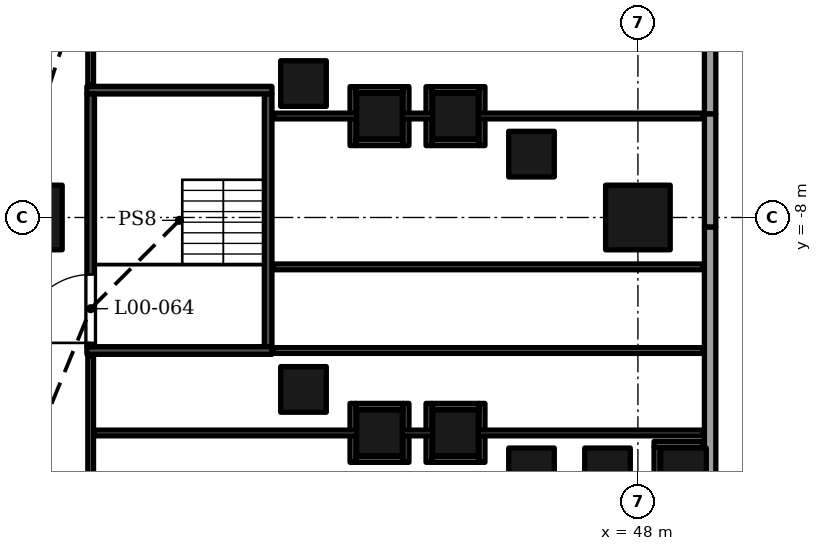
"""IFC4 building model, lengths in metres.
Left out: names, types, materials, properties, quantities, classifications, styles, units other than length and angle.
Written with IfcOpenShell. Run it as: python <this file> out.ifc"""

import sys

from ifc_helpers import new_model, si_unit, direction, frame, frame_2d, origin, origin_2d, place, context, subcontext, project, spatial, rectangle, extrude, element, fill, save


model = new_model("IFC4")
c1 = context("Model", 3, precision=1e-05, world=origin(), true_north=direction((0.0, 1.0)))
c2 = subcontext(c1, "Body", "Model", "MODEL_VIEW")
j1 = project(units=[si_unit("LENGTHUNIT", "METRE"), si_unit("PLANEANGLEUNIT", "RADIAN")], contexts=[c1])
p1 = place(None, origin())
s1 = spatial("IfcSite", under=j1, at=p1, CompositionType="ELEMENT")
p2 = place(p1, origin())
s2 = spatial("IfcBuilding", under=s1, at=p2, CompositionType="ELEMENT")
p3 = place(p2, origin())
s3 = spatial("IfcBuildingStorey", under=s2, at=p3, CompositionType="ELEMENT", Elevation=0.0)
for number, where, z_axis, x_axis in (
    (1, (32.0, -8.0, 0.0), (0.0, 0.0, 1.0), (1.0, 0.0, 0.0)),
    (2, (48.0, -8.0, 0.0), (0.0, 0.0, 1.0), (1.0, 0.0, 0.0)),
):
    element("IfcColumn", number, at=place(p3, frame(where, z_axis=z_axis, x_axis=x_axis)), inside=s3, PredefinedType="COLUMN", context=c2, shape_type="SweptSolid", body=[
        extrude(rectangle(XDim=1.7, YDim=1.7, at=origin_2d()), origin(), (0.0, 0.0, 1.0), 9.0),
    ])
for number, where, z_axis, x_axis in (
    (3, (39.2, -4.476, 0.0), (0.0, 0.0, 1.0), (1.0, 0.0, 0.0)),
    (4, (39.2, -12.524, 0.0), (0.0, 0.0, 1.0), (1.0, 0.0, 0.0)),
    (5, (41.2, -5.333, 0.0), (0.0, 0.0, 1.0), (1.0, 0.0, 0.0)),
    (6, (41.2, -13.667, 0.0), (0.0, 0.0, 1.0), (1.0, 0.0, 0.0)),
    (7, (43.2, -5.333, 0.0), (0.0, 0.0, 1.0), (1.0, 0.0, 0.0)),
    (8, (43.2, -13.667, 0.0), (0.0, 0.0, 1.0), (1.0, 0.0, 0.0)),
    (9, (45.2, -6.333, 0.0), (0.0, 0.0, 1.0), (1.0, 0.0, 0.0)),
    (10, (45.2, -14.667, 0.0), (0.0, 0.0, 1.0), (1.0, 0.0, 0.0)),
    (11, (47.2, -14.667, 0.0), (0.0, 0.0, 1.0), (1.0, 0.0, 0.0)),
    (12, (49.2, -14.667, 0.0), (0.0, 0.0, 1.0), (1.0, 0.0, 0.0)),
):
    element("IfcColumn", number, at=place(p3, frame(where, z_axis=z_axis, x_axis=x_axis)), inside=s3, PredefinedType="COLUMN", context=c2, shape_type="SweptSolid", body=[
        extrude(rectangle(XDim=1.2, YDim=1.2, at=origin_2d()), origin(), (0.0, 0.0, 1.0), 9.0),
    ])
p4 = place(p3, frame((49.9, -14.948, 0.0), z_axis=(0.0, 0.0, 1.0), x_axis=(0.0, 1.0, 0.0)))
e13 = element("IfcWall", 13, at=p4, inside=s3, PredefinedType="ELEMENTEDWALL", context=c2, shape_type="SweptSolid", body=[
    extrude(rectangle(XDim=6.7, YDim=0.3, at=frame_2d((3.35, 0.0))), origin(), (0.0, 0.0, 1.0), 7.6),
])
p5 = place(p4, frame((3.548, 0.0, 0.0)))
e14 = element("IfcOpeningElement", 14, at=p5, cuts=e13, PredefinedType="OPENING", context=c2, shape_type="SweptSolid", body=[
    extrude(rectangle(XDim=2.0, YDim=2.4, at=frame_2d((1.0, 1.2))), frame((0.0, 0.16, 0.0), z_axis=(0.0, -1.0, 0.0), x_axis=(1.0, 0.0, 0.0)), (0.0, 0.0, 1.0), 0.32),
])
p6 = place(p3, frame((49.9, -8.248, 0.0), z_axis=(0.0, 0.0, 1.0), x_axis=(0.0, 1.0, 0.0)))
e15 = element("IfcWall", 15, at=p6, inside=s3, PredefinedType="ELEMENTEDWALL", context=c2, shape_type="SweptSolid", body=[
    extrude(rectangle(XDim=2.977, YDim=0.3, at=frame_2d((1.489, 0.0))), origin(), (0.0, 0.0, 1.0), 7.6),
])
p7 = place(p6, frame((1.152, 0.0, 0.0)))
e16 = element("IfcOpeningElement", 16, at=p7, cuts=e15, PredefinedType="OPENING", context=c2, shape_type="SweptSolid", body=[
    extrude(rectangle(XDim=1.2, YDim=2.7, at=frame_2d((0.6, 1.35))), frame((0.0, 0.16, 0.0), z_axis=(0.0, -1.0, 0.0), x_axis=(1.0, 0.0, 0.0)), (0.0, 0.0, 1.0), 0.32),
])
p8 = place(p3, frame((49.9, -5.271, 0.0), z_axis=(0.0, 0.0, 1.0), x_axis=(0.0, 1.0, 0.0)))
e17 = element("IfcWall", 17, at=p8, inside=s3, PredefinedType="ELEMENTEDWALL", context=c2, shape_type="SweptSolid", body=[
    extrude(rectangle(XDim=2.748, YDim=0.3, at=frame_2d((1.374, 0.0))), origin(), (0.0, 0.0, 1.0), 7.6),
])
p9 = place(p8, frame((0.625, 0.0, 0.0)))
e18 = element("IfcOpeningElement", 18, at=p9, cuts=e17, PredefinedType="OPENING", context=c2, shape_type="SweptSolid", body=[
    extrude(rectangle(XDim=1.8, YDim=2.7, at=frame_2d((0.9, 1.35))), frame((0.0, 0.16, 0.0), z_axis=(0.0, -1.0, 0.0), x_axis=(1.0, 0.0, 0.0)), (0.0, 0.0, 1.0), 0.32),
])
for number, where, z_axis, x_axis in (
    (19, (49.85, -25.093, 9.0), (0.0, 0.0, 1.0), (0.0, 1.0, 0.0)),
    (20, (49.85, -10.395, 9.0), (0.0, 0.0, 1.0), (0.0, 1.0, 0.0)),
):
    element("IfcWall", number, at=place(p3, frame(where, z_axis=z_axis, x_axis=x_axis)), inside=s3, PredefinedType="PARAPET", context=c2, shape_type="SweptSolid", body=[
        extrude(rectangle(XDim=14.698, YDim=0.3, at=frame_2d((7.349, 0.0))), origin(), (0.0, 0.0, 1.0), 1.1),
    ])
for number, where, z_axis, x_axis in (
    (21, (33.5, -11.5, 0.0), (0.0, 0.0, 1.0), (1.0, 0.0, 0.0)),
    (22, (33.5, -4.65, 0.0), (0.0, 0.0, 1.0), (1.0, 0.0, 0.0)),
):
    element("IfcWall", number, at=place(p3, frame(where, z_axis=z_axis, x_axis=x_axis)), inside=s3, PredefinedType="SOLIDWALL", context=c2, shape_type="SweptSolid", body=[
        extrude(rectangle(XDim=4.87, YDim=0.2, at=frame_2d((2.435, 0.0))), origin(), (0.0, 0.0, 1.0), 8.5),
    ])
p10 = place(p3, frame((33.6, -11.4, 0.0), z_axis=(0.0, 0.0, 1.0), x_axis=(0.0, 1.0, 0.0)))
e23 = element("IfcWall", 23, at=p10, inside=s3, PredefinedType="SOLIDWALL", context=c2, shape_type="SweptSolid", body=[
    extrude(rectangle(XDim=6.65, YDim=0.2, at=frame_2d((3.325, 0.0))), origin(), (0.0, 0.0, 1.0), 8.5),
])
p11 = place(p10, frame((0.1, 0.0, 0.0)))
e24 = element("IfcOpeningElement", 24, at=p11, cuts=e23, PredefinedType="OPENING", context=c2, shape_type="SweptSolid", body=[
    extrude(rectangle(XDim=1.8, YDim=2.4, at=frame_2d((0.9, 1.2))), frame((0.0, 0.11, 0.0), z_axis=(0.0, -1.0, 0.0), x_axis=(1.0, 0.0, 0.0)), (0.0, 0.0, 1.0), 0.22),
])
p12 = place(p3, frame((38.27, -11.4, 0.0), z_axis=(0.0, 0.0, 1.0), x_axis=(0.0, 1.0, 0.0)))
e25 = element("IfcWall", 25, at=p12, inside=s3, PredefinedType="SOLIDWALL", context=c2, shape_type="SweptSolid", body=[
    extrude(rectangle(XDim=6.65, YDim=0.2, at=frame_2d((3.325, 0.0))), origin(), (0.0, 0.0, 1.0), 8.5),
])
p13 = place(p12, frame((0.1, 0.0, 0.0)))
e26 = element("IfcOpeningElement", 26, at=p13, cuts=e25, PredefinedType="OPENING", context=c2, shape_type="SweptSolid", body=[
    extrude(rectangle(XDim=1.8, YDim=2.4, at=frame_2d((0.9, 1.2))), frame((0.0, 0.11, 0.0), z_axis=(0.0, -1.0, 0.0), x_axis=(1.0, 0.0, 0.0)), (0.0, 0.0, 1.0), 0.22),
])
p14 = place(p3, frame((33.6, -20.61, 0.0), z_axis=(0.0, 0.0, 1.0), x_axis=(0.0, 1.0, 0.0)))
e27 = element("IfcWall", 27, at=p14, inside=s3, PredefinedType="PARTITIONING", context=c2, shape_type="SweptSolid", body=[
    extrude(rectangle(XDim=8.97, YDim=0.15, at=frame_2d((4.485, 0.0))), origin(), (0.0, 0.0, 1.0), 8.5),
])
p15 = place(p14, frame((2.89, 0.0, 0.0)))
e28 = element("IfcOpeningElement", 28, at=p15, cuts=e27, PredefinedType="OPENING", context=c2, shape_type="SweptSolid", body=[
    extrude(rectangle(XDim=1.2, YDim=2.1, at=frame_2d((0.6, 1.05))), frame((0.0, 0.085, 0.0), z_axis=(0.0, -1.0, 0.0), x_axis=(1.0, 0.0, 0.0)), (0.0, 0.0, 1.0), 0.17),
])
p16 = place(p3, frame((48.5, -15.292, 0.0), z_axis=(0.0, 0.0, 1.0), x_axis=(0.0, 1.0, 0.0)))
e29 = element("IfcWall", 29, at=p16, inside=s3, PredefinedType="PARTITIONING", context=c2, shape_type="SweptSolid", body=[
    extrude(rectangle(XDim=1.25, YDim=0.15, at=frame_2d((0.625, 0.0))), origin(), (0.0, 0.0, 1.0), 8.5),
])
p17 = place(p3, frame((40.5, -14.442, 0.0), z_axis=(0.0, 0.0, 1.0), x_axis=(0.0, 1.0, 0.0)))
e30 = element("IfcWall", 30, at=p17, inside=s3, PredefinedType="PARTITIONING", context=c2, shape_type="SweptSolid", body=[
    extrude(rectangle(XDim=1.55, YDim=0.15, at=frame_2d((0.775, 0.0))), origin(), (0.0, 0.0, 1.0), 8.5),
])
p18 = place(p3, frame((40.575, -14.367, 0.0), z_axis=(0.0, 0.0, 1.0), x_axis=(1.0, 0.0, 0.0)))
e31 = element("IfcWall", 31, at=p18, inside=s3, PredefinedType="PARTITIONING", context=c2, shape_type="SweptSolid", body=[
    extrude(rectangle(XDim=1.25, YDim=0.15, at=frame_2d((0.625, 0.0))), origin(), (0.0, 0.0, 1.0), 8.5),
])
for number, where, z_axis, x_axis in (
    (32, (41.9, -14.442, 0.0), (0.0, 0.0, 1.0), (0.0, 1.0, 0.0)),
    (33, (42.5, -14.442, 0.0), (0.0, 0.0, 1.0), (0.0, 1.0, 0.0)),
):
    element("IfcWall", number, at=place(p3, frame(where, z_axis=z_axis, x_axis=x_axis)), inside=s3, PredefinedType="PARTITIONING", context=c2, shape_type="SweptSolid", body=[
        extrude(rectangle(XDim=1.55, YDim=0.15, at=frame_2d((0.775, 0.0))), origin(), (0.0, 0.0, 1.0), 8.5),
    ])
p19 = place(p3, frame((42.575, -14.367, 0.0), z_axis=(0.0, 0.0, 1.0), x_axis=(1.0, 0.0, 0.0)))
e34 = element("IfcWall", 34, at=p19, inside=s3, PredefinedType="PARTITIONING", context=c2, shape_type="SweptSolid", body=[
    extrude(rectangle(XDim=1.25, YDim=0.15, at=frame_2d((0.625, 0.0))), origin(), (0.0, 0.0, 1.0), 8.5),
])
p20 = place(p3, frame((43.9, -14.442, 0.0), z_axis=(0.0, 0.0, 1.0), x_axis=(0.0, 1.0, 0.0)))
e35 = element("IfcWall", 35, at=p20, inside=s3, PredefinedType="PARTITIONING", context=c2, shape_type="SweptSolid", body=[
    extrude(rectangle(XDim=1.55, YDim=0.15, at=frame_2d((0.775, 0.0))), origin(), (0.0, 0.0, 1.0), 8.5),
])
p21 = place(p3, frame((48.425, -13.967, 0.0), z_axis=(0.0, 0.0, 1.0), x_axis=(1.0, 0.0, 0.0)))
e36 = element("IfcWall", 36, at=p21, inside=s3, PredefinedType="PARTITIONING", context=c2, shape_type="SweptSolid", body=[
    extrude(rectangle(XDim=1.295, YDim=0.15, at=frame_2d((0.647, 0.0))), origin(), (0.0, 0.0, 1.0), 8.5),
])
p22 = place(p3, frame((33.675, -13.67, 0.0), z_axis=(0.0, 0.0, 1.0), x_axis=(1.0, 0.0, 0.0)))
e37 = element("IfcWall", 37, at=p22, inside=s3, PredefinedType="PARTITIONING", context=c2, shape_type="SweptSolid", body=[
    extrude(rectangle(XDim=6.925, YDim=0.15, at=frame_2d((3.462, 0.0))), origin(), (0.0, 0.0, 1.0), 8.5),
])
p23 = place(p3, frame((41.8, -13.67, 0.0), z_axis=(0.0, 0.0, 1.0), x_axis=(1.0, 0.0, 0.0)))
e38 = element("IfcWall", 38, at=p23, inside=s3, PredefinedType="PARTITIONING", context=c2, shape_type="SweptSolid", body=[
    extrude(rectangle(XDim=0.8, YDim=0.15, at=frame_2d((0.4, 0.0))), origin(), (0.0, 0.0, 1.0), 8.5),
])
p24 = place(p3, frame((43.8, -13.67, 0.0), z_axis=(0.0, 0.0, 1.0), x_axis=(1.0, 0.0, 0.0)))
e39 = element("IfcWall", 39, at=p24, inside=s3, PredefinedType="PARTITIONING", context=c2, shape_type="SweptSolid", body=[
    extrude(rectangle(XDim=5.92, YDim=0.15, at=frame_2d((2.96, 0.0))), origin(), (0.0, 0.0, 1.0), 7.6),
])
for number, where, z_axis, x_axis in (
    (40, (40.575, -12.967, 0.0), (0.0, 0.0, 1.0), (1.0, 0.0, 0.0)),
    (41, (42.575, -12.967, 0.0), (0.0, 0.0, 1.0), (1.0, 0.0, 0.0)),
):
    element("IfcWall", number, at=place(p3, frame(where, z_axis=z_axis, x_axis=x_axis)), inside=s3, PredefinedType="PARTITIONING", context=c2, shape_type="SweptSolid", body=[
        extrude(rectangle(XDim=1.25, YDim=0.15, at=frame_2d((0.625, 0.0))), origin(), (0.0, 0.0, 1.0), 8.5),
    ])
p25 = place(p3, frame((38.41, -11.5, 0.0), z_axis=(0.0, 0.0, 1.0), x_axis=(1.0, 0.0, 0.0)))
e42 = element("IfcWall", 42, at=p25, inside=s3, PredefinedType="PARTITIONING", context=c2, shape_type="SweptSolid", body=[
    extrude(rectangle(XDim=11.31, YDim=0.151, at=frame_2d((5.655, 0.0))), origin(), (0.0, 0.0, 1.0), 7.6),
])
p26 = place(p25, frame((5.04, 0.0, 0.0)))
e43 = element("IfcOpeningElement", 43, at=p26, cuts=e42, PredefinedType="OPENING", context=c2, shape_type="SweptSolid", body=[
    extrude(rectangle(XDim=1.2, YDim=2.1, at=frame_2d((0.6, 1.05))), frame((0.0, 0.085, 0.0), z_axis=(0.0, -1.0, 0.0), x_axis=(1.0, 0.0, 0.0)), (0.0, 0.0, 1.0), 0.171),
])
p27 = place(p3, frame((38.41, -9.3, 0.0), z_axis=(0.0, 0.0, 1.0), x_axis=(1.0, 0.0, 0.0)))
e44 = element("IfcWall", 44, at=p27, inside=s3, PredefinedType="PARTITIONING", context=c2, shape_type="SweptSolid", body=[
    extrude(rectangle(XDim=11.31, YDim=0.151, at=frame_2d((5.655, 0.0))), origin(), (0.0, 0.0, 1.0), 7.6),
])
p28 = place(p27, frame((4.961, 0.0, 0.0)))
e45 = element("IfcOpeningElement", 45, at=p28, cuts=e44, PredefinedType="OPENING", context=c2, shape_type="SweptSolid", body=[
    extrude(rectangle(XDim=1.2, YDim=2.1, at=frame_2d((0.6, 1.05))), frame((0.0, 0.085, 0.0), z_axis=(0.0, -1.0, 0.0), x_axis=(1.0, 0.0, 0.0)), (0.0, 0.0, 1.0), 0.171),
])
p29 = place(p3, frame((40.5, -6.108, 0.0), z_axis=(0.0, 0.0, 1.0), x_axis=(0.0, 1.0, 0.0)))
e46 = element("IfcWall", 46, at=p29, inside=s3, PredefinedType="PARTITIONING", context=c2, shape_type="SweptSolid", body=[
    extrude(rectangle(XDim=1.55, YDim=0.15, at=frame_2d((0.775, 0.0))), origin(), (0.0, 0.0, 1.0), 8.5),
])
p30 = place(p3, frame((40.575, -6.033, 0.0), z_axis=(0.0, 0.0, 1.0), x_axis=(1.0, 0.0, 0.0)))
e47 = element("IfcWall", 47, at=p30, inside=s3, PredefinedType="PARTITIONING", context=c2, shape_type="SweptSolid", body=[
    extrude(rectangle(XDim=1.25, YDim=0.15, at=frame_2d((0.625, 0.0))), origin(), (0.0, 0.0, 1.0), 8.5),
])
for number, where, z_axis, x_axis in (
    (48, (41.9, -6.108, 0.0), (0.0, 0.0, 1.0), (0.0, 1.0, 0.0)),
    (49, (42.5, -6.108, 0.0), (0.0, 0.0, 1.0), (0.0, 1.0, 0.0)),
):
    element("IfcWall", number, at=place(p3, frame(where, z_axis=z_axis, x_axis=x_axis)), inside=s3, PredefinedType="PARTITIONING", context=c2, shape_type="SweptSolid", body=[
        extrude(rectangle(XDim=1.55, YDim=0.15, at=frame_2d((0.775, 0.0))), origin(), (0.0, 0.0, 1.0), 8.5),
    ])
p31 = place(p3, frame((42.575, -6.033, 0.0), z_axis=(0.0, 0.0, 1.0), x_axis=(1.0, 0.0, 0.0)))
e50 = element("IfcWall", 50, at=p31, inside=s3, PredefinedType="PARTITIONING", context=c2, shape_type="SweptSolid", body=[
    extrude(rectangle(XDim=1.25, YDim=0.15, at=frame_2d((0.625, 0.0))), origin(), (0.0, 0.0, 1.0), 8.5),
])
p32 = place(p3, frame((43.9, -6.108, 0.0), z_axis=(0.0, 0.0, 1.0), x_axis=(0.0, 1.0, 0.0)))
e51 = element("IfcWall", 51, at=p32, inside=s3, PredefinedType="PARTITIONING", context=c2, shape_type="SweptSolid", body=[
    extrude(rectangle(XDim=1.55, YDim=0.15, at=frame_2d((0.775, 0.0))), origin(), (0.0, 0.0, 1.0), 8.5),
])
p33 = place(p3, frame((38.41, -5.33, 0.0), z_axis=(0.0, 0.0, 1.0), x_axis=(1.0, 0.0, 0.0)))
e52 = element("IfcWall", 52, at=p33, inside=s3, PredefinedType="PARTITIONING", context=c2, shape_type="SweptSolid", body=[
    extrude(rectangle(XDim=2.19, YDim=0.15, at=frame_2d((1.095, 0.0))), origin(), (0.0, 0.0, 1.0), 8.5),
])
p34 = place(p3, frame((41.8, -5.33, 0.0), z_axis=(0.0, 0.0, 1.0), x_axis=(1.0, 0.0, 0.0)))
e53 = element("IfcWall", 53, at=p34, inside=s3, PredefinedType="PARTITIONING", context=c2, shape_type="SweptSolid", body=[
    extrude(rectangle(XDim=0.8, YDim=0.15, at=frame_2d((0.4, 0.0))), origin(), (0.0, 0.0, 1.0), 8.5),
])
p35 = place(p3, frame((43.8, -5.33, 0.0), z_axis=(0.0, 0.0, 1.0), x_axis=(1.0, 0.0, 0.0)))
e54 = element("IfcWall", 54, at=p35, inside=s3, PredefinedType="PARTITIONING", context=c2, shape_type="SweptSolid", body=[
    extrude(rectangle(XDim=5.92, YDim=0.15, at=frame_2d((2.96, 0.0))), origin(), (0.0, 0.0, 1.0), 7.6),
])
for number, where, z_axis, x_axis in (
    (55, (40.575, -4.633, 0.0), (0.0, 0.0, 1.0), (1.0, 0.0, 0.0)),
    (56, (42.575, -4.633, 0.0), (0.0, 0.0, 1.0), (1.0, 0.0, 0.0)),
):
    element("IfcWall", number, at=place(p3, frame(where, z_axis=z_axis, x_axis=x_axis)), inside=s3, PredefinedType="PARTITIONING", context=c2, shape_type="SweptSolid", body=[
        extrude(rectangle(XDim=1.25, YDim=0.15, at=frame_2d((0.625, 0.0))), origin(), (0.0, 0.0, 1.0), 8.5),
    ])
p36 = place(p3, frame((33.6, -4.51, 0.0), z_axis=(0.0, 0.0, 1.0), x_axis=(0.0, 1.0, 0.0)))
e57 = element("IfcWall", 57, at=p36, inside=s3, PredefinedType="PARTITIONING", context=c2, shape_type="SweptSolid", body=[
    extrude(rectangle(XDim=2.07, YDim=0.15, at=frame_2d((1.035, 0.0))), origin(), (0.0, 0.0, 1.0), 8.5),
])
p37 = place(p5, origin())
e58 = element("IfcDoor", 58, at=p37, inside=s3, OperationType="DOUBLE_DOOR_SINGLE_SWING", PredefinedType="DOOR", context=c2, shape_type="SweptSolid", body=[
    extrude(rectangle(XDim=2.0, YDim=2.4, at=frame_2d((1.0, 1.2))), frame((0.0, 0.025, 0.0), z_axis=(0.0, -1.0, 0.0), x_axis=(1.0, 0.0, 0.0)), (0.0, 0.0, 1.0), 0.05),
])
fill(e14, e58)
p38 = place(p7, origin())
e59 = element("IfcDoor", 59, at=p38, inside=s3, OperationType="DOUBLE_DOOR_SINGLE_SWING", PredefinedType="DOOR", context=c2, shape_type="SweptSolid", body=[
    extrude(rectangle(XDim=1.2, YDim=2.7, at=frame_2d((0.6, 1.35))), frame((0.0, 0.025, 0.0), z_axis=(0.0, -1.0, 0.0), x_axis=(1.0, 0.0, 0.0)), (0.0, 0.0, 1.0), 0.05),
])
fill(e16, e59)
p39 = place(p9, origin())
e60 = element("IfcDoor", 60, at=p39, inside=s3, OperationType="DOUBLE_DOOR_SINGLE_SWING", PredefinedType="DOOR", context=c2, shape_type="SweptSolid", body=[
    extrude(rectangle(XDim=1.8, YDim=2.7, at=frame_2d((0.9, 1.35))), frame((0.0, 0.025, 0.0), z_axis=(0.0, -1.0, 0.0), x_axis=(1.0, 0.0, 0.0)), (0.0, 0.0, 1.0), 0.05),
])
fill(e18, e60)
p40 = place(p11, origin())
e61 = element("IfcDoor", 61, at=p40, inside=s3, OperationType="DOUBLE_DOOR_SINGLE_SWING", PredefinedType="DOOR", context=c2, shape_type="SweptSolid", body=[
    extrude(rectangle(XDim=1.8, YDim=2.4, at=frame_2d((0.9, 1.2))), frame((0.0, 0.025, 0.0), z_axis=(0.0, -1.0, 0.0), x_axis=(1.0, 0.0, 0.0)), (0.0, 0.0, 1.0), 0.05),
])
fill(e24, e61)
p41 = place(p13, origin())
e62 = element("IfcDoor", 62, at=p41, inside=s3, OperationType="DOUBLE_DOOR_SINGLE_SWING", PredefinedType="DOOR", context=c2, shape_type="SweptSolid", body=[
    extrude(rectangle(XDim=1.8, YDim=2.4, at=frame_2d((0.9, 1.2))), frame((0.0, 0.025, 0.0), z_axis=(0.0, -1.0, 0.0), x_axis=(1.0, 0.0, 0.0)), (0.0, 0.0, 1.0), 0.05),
])
fill(e26, e62)
p42 = place(p26, origin())
e63 = element("IfcDoor", 63, at=p42, inside=s3, OperationType="SINGLE_SWING_LEFT", PredefinedType="DOOR", context=c2, shape_type="SweptSolid", body=[
    extrude(rectangle(XDim=1.2, YDim=2.1, at=frame_2d((0.6, 1.05))), frame((0.0, 0.025, 0.0), z_axis=(0.0, -1.0, 0.0), x_axis=(1.0, 0.0, 0.0)), (0.0, 0.0, 1.0), 0.05),
])
fill(e43, e63)
p43 = place(p28, origin())
e64 = element("IfcDoor", 64, at=p43, inside=s3, OperationType="SINGLE_SWING_LEFT", PredefinedType="DOOR", context=c2, shape_type="SweptSolid", body=[
    extrude(rectangle(XDim=1.2, YDim=2.1, at=frame_2d((0.6, 1.05))), frame((0.0, 0.025, 0.0), z_axis=(0.0, -1.0, 0.0), x_axis=(1.0, 0.0, 0.0)), (0.0, 0.0, 1.0), 0.05),
])
fill(e45, e64)
save(model, sys.argv[1])
